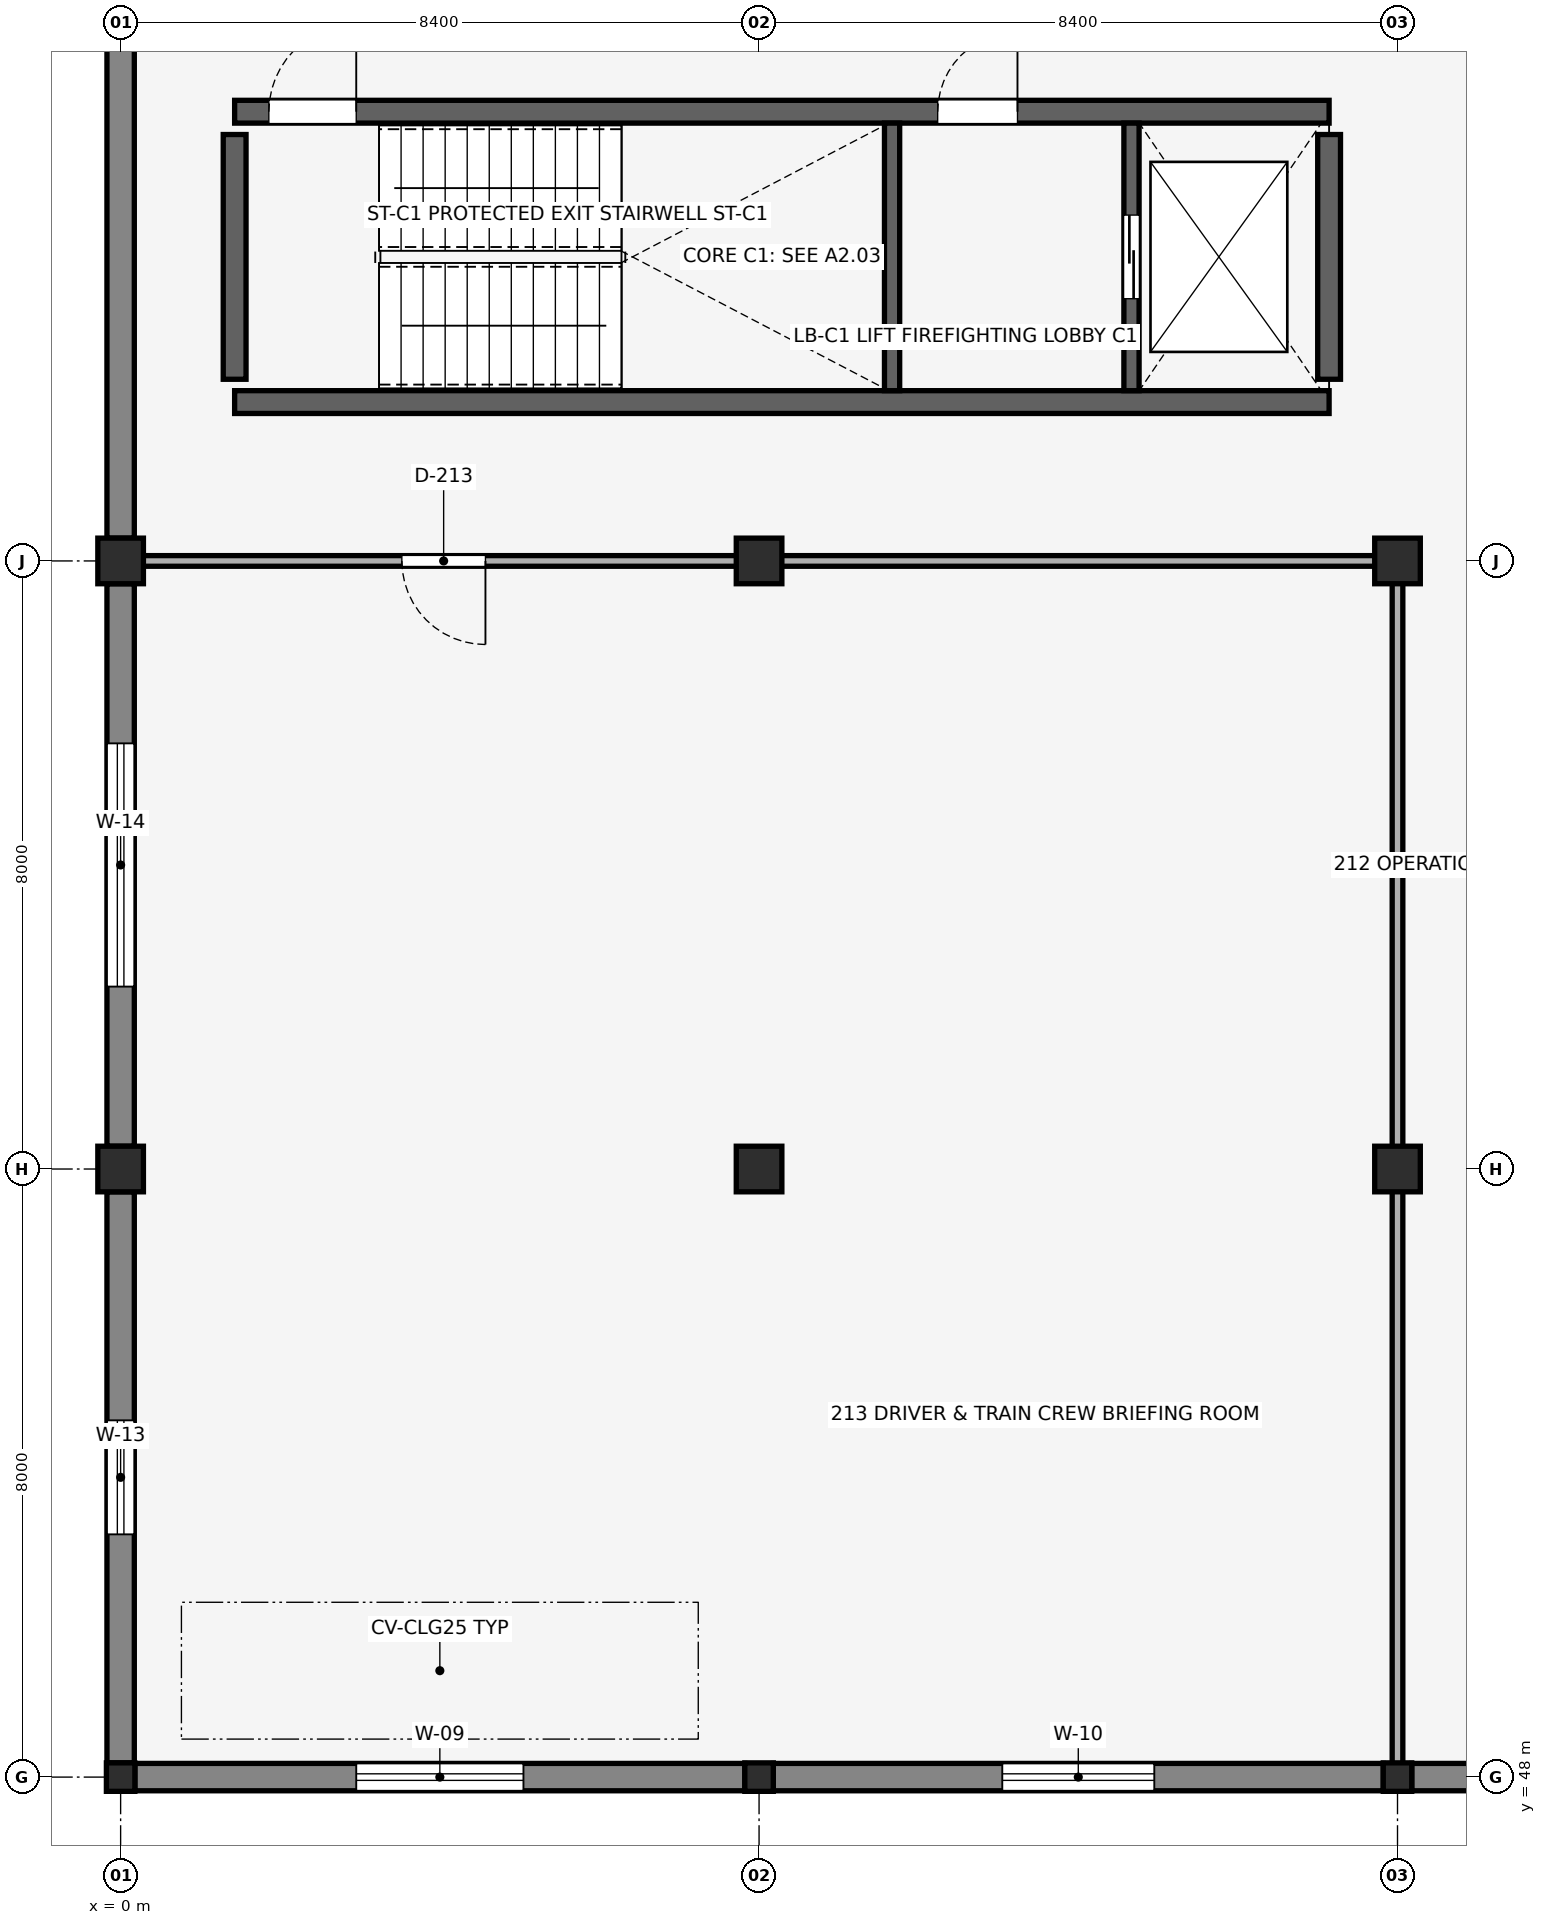
"""IFC4 building model, lengths in metres.
Left out: names, types, materials, properties, quantities, classifications, styles, units other than length and angle.
Written with IfcOpenShell. Run it as: python <this file> out.ifc"""

import sys

from ifc_helpers import new_model, si_unit, direction, frame, frame_2d, origin, origin_2d, place, context, subcontext, project, spatial, rectangle, i_section, extrude, element, fill, save


model = new_model("IFC4")
c1 = context("Model", 3, precision=1e-05, world=origin(), true_north=direction((0.0, 1.0)))
c2 = subcontext(c1, "Body", "Model", "MODEL_VIEW")
j1 = project(units=[si_unit("LENGTHUNIT", "METRE"), si_unit("PLANEANGLEUNIT", "RADIAN")], contexts=[c1])
p1 = place(None, origin())
s1 = spatial("IfcSite", under=j1, at=p1, CompositionType="ELEMENT")
p2 = place(p1, origin())
s2 = spatial("IfcBuilding", under=s1, at=p2, CompositionType="ELEMENT")
p3 = place(p2, frame((0.0, 0.0, 9.52)))
s3 = spatial("IfcBuildingStorey", under=s2, at=p3, CompositionType="ELEMENT", Elevation=9.52)
p4 = place(p3, frame((1.5, 66.09, 0.0), z_axis=(0.0, 0.0, 1.0), x_axis=(1.0, 0.0, 0.0)))
e1 = element("IfcWall", 1, at=p4, inside=s3, PredefinedType="SHEAR", context=c2, shape_type="SweptSolid", body=[
    extrude(rectangle(XDim=14.4, YDim=0.3, at=frame_2d((7.2, 0.0))), origin(), (0.0, 0.0, 1.0), 3.57),
])
p5 = place(p3, frame((1.5, 69.91, 0.0), z_axis=(0.0, 0.0, 1.0), x_axis=(1.0, 0.0, 0.0)))
e2 = element("IfcWall", 2, at=p5, inside=s3, PredefinedType="SHEAR", context=c2, shape_type="SweptSolid", body=[
    extrude(rectangle(XDim=14.4, YDim=0.3, at=frame_2d((7.2, 0.0))), origin(), (0.0, 0.0, 1.0), 3.57),
])
p6 = place(p5, frame((0.45, 0.0, 0.0), z_axis=(0.0, 0.0, 1.0), x_axis=(1.0, 0.0, 0.0)))
e3 = element("IfcOpeningElement", 3, at=p6, cuts=e2, PredefinedType="OPENING", context=c2, shape_type="SweptSolid", body=[
    extrude(rectangle(XDim=1.15, YDim=2.15, at=frame_2d((0.575, 1.075))), frame((0.0, 0.16, 0.0), z_axis=(0.0, -1.0, 0.0), x_axis=(1.0, 0.0, 0.0)), (0.0, 0.0, 1.0), 0.32),
])
p7 = place(p5, frame((9.25, 0.0, 0.0), z_axis=(0.0, 0.0, 1.0), x_axis=(1.0, 0.0, 0.0)))
e4 = element("IfcOpeningElement", 4, at=p7, cuts=e2, PredefinedType="OPENING", context=c2, shape_type="SweptSolid", body=[
    extrude(rectangle(XDim=1.05, YDim=2.15, at=frame_2d((0.525, 1.075))), frame((0.0, 0.16, 0.0), z_axis=(0.0, -1.0, 0.0), x_axis=(1.0, 0.0, 0.0)), (0.0, 0.0, 1.0), 0.32),
])
for number, where, z_axis, x_axis in (
    (5, (1.5, 66.39, 0.0), (0.0, 0.0, 1.0), (0.0, 1.0, 0.0)),
    (6, (15.9, 66.39, 0.0), (0.0, 0.0, 1.0), (0.0, 1.0, 0.0)),
):
    element("IfcWall", number, at=place(p3, frame(where, z_axis=z_axis, x_axis=x_axis)), inside=s3, PredefinedType="SHEAR", context=c2, shape_type="SweptSolid", body=[
        extrude(rectangle(XDim=3.22, YDim=0.3, at=frame_2d((1.61, 0.0))), origin(), (0.0, 0.0, 1.0), 3.57),
    ])
p8 = place(p3, frame((0.0, 48.0, 0.0), z_axis=(0.0, 0.0, 1.0), x_axis=(1.0, 0.0, 0.0)))
e7 = element("IfcColumn", 7, at=p8, inside=s3, PredefinedType="COLUMN", context=c2, shape_type="SweptSolid", body=[
    extrude(i_section(OverallWidth=0.375, OverallDepth=0.375, WebThickness=0.017, FlangeThickness=0.027, FilletRadius=0.015, at=origin_2d()), origin(), (0.0, 0.0, 1.0), 3.57),
])
for number, where, z_axis, x_axis in (
    (8, (0.0, 56.0, 0.0), (0.0, 0.0, 1.0), (1.0, 0.0, 0.0)),
    (9, (0.0, 64.0, 0.0), (0.0, 0.0, 1.0), (1.0, 0.0, 0.0)),
):
    element("IfcColumn", number, at=place(p3, frame(where, z_axis=z_axis, x_axis=x_axis)), inside=s3, PredefinedType="COLUMN", context=c2, shape_type="SweptSolid", body=[
        extrude(rectangle(XDim=0.6, YDim=0.6, at=origin_2d()), origin(), (0.0, 0.0, 1.0), 3.57),
    ])
p9 = place(p3, frame((8.4, 48.0, 0.0), z_axis=(0.0, 0.0, 1.0), x_axis=(1.0, 0.0, 0.0)))
e10 = element("IfcColumn", 10, at=p9, inside=s3, PredefinedType="COLUMN", context=c2, shape_type="SweptSolid", body=[
    extrude(i_section(OverallWidth=0.375, OverallDepth=0.375, WebThickness=0.017, FlangeThickness=0.027, FilletRadius=0.015, at=origin_2d()), origin(), (0.0, 0.0, 1.0), 3.57),
])
for number, where, z_axis, x_axis in (
    (11, (8.4, 56.0, 0.0), (0.0, 0.0, 1.0), (1.0, 0.0, 0.0)),
    (12, (8.4, 64.0, 0.0), (0.0, 0.0, 1.0), (1.0, 0.0, 0.0)),
):
    element("IfcColumn", number, at=place(p3, frame(where, z_axis=z_axis, x_axis=x_axis)), inside=s3, PredefinedType="COLUMN", context=c2, shape_type="SweptSolid", body=[
        extrude(rectangle(XDim=0.6, YDim=0.6, at=origin_2d()), origin(), (0.0, 0.0, 1.0), 3.57),
    ])
p10 = place(p3, frame((16.8, 48.0, 0.0), z_axis=(0.0, 0.0, 1.0), x_axis=(1.0, 0.0, 0.0)))
e13 = element("IfcColumn", 13, at=p10, inside=s3, PredefinedType="COLUMN", context=c2, shape_type="SweptSolid", body=[
    extrude(i_section(OverallWidth=0.375, OverallDepth=0.375, WebThickness=0.017, FlangeThickness=0.027, FilletRadius=0.015, at=origin_2d()), origin(), (0.0, 0.0, 1.0), 3.57),
])
for number, where, z_axis, x_axis in (
    (14, (16.8, 56.0, 0.0), (0.0, 0.0, 1.0), (1.0, 0.0, 0.0)),
    (15, (16.8, 64.0, 0.0), (0.0, 0.0, 1.0), (1.0, 0.0, 0.0)),
):
    element("IfcColumn", number, at=place(p3, frame(where, z_axis=z_axis, x_axis=x_axis)), inside=s3, PredefinedType="COLUMN", context=c2, shape_type="SweptSolid", body=[
        extrude(rectangle(XDim=0.6, YDim=0.6, at=origin_2d()), origin(), (0.0, 0.0, 1.0), 3.57),
    ])
p11 = place(p3, frame((0.187, 48.0, 0.0), z_axis=(0.0, 0.0, 1.0), x_axis=(1.0, 0.0, 0.0)))
e16 = element("IfcWall", 16, at=p11, inside=s3, PredefinedType="SOLIDWALL", context=c2, shape_type="SweptSolid", body=[
    extrude(rectangle(XDim=8.025, YDim=0.36, at=frame_2d((4.013, 0.0))), origin(), (0.0, 0.0, 1.0), 3.27),
])
p12 = place(p11, frame((2.913, 0.0, 0.9), z_axis=(0.0, 0.0, 1.0), x_axis=(1.0, 0.0, 0.0)))
e17 = element("IfcOpeningElement", 17, at=p12, cuts=e16, PredefinedType="OPENING", context=c2, shape_type="SweptSolid", body=[
    extrude(rectangle(XDim=2.2, YDim=1.5, at=frame_2d((1.1, 0.75))), frame((0.0, 0.19, 0.0), z_axis=(0.0, -1.0, 0.0), x_axis=(1.0, 0.0, 0.0)), (0.0, 0.0, 1.0), 0.38),
])
p13 = place(p3, frame((8.587, 48.0, 0.0), z_axis=(0.0, 0.0, 1.0), x_axis=(1.0, 0.0, 0.0)))
e18 = element("IfcWall", 18, at=p13, inside=s3, PredefinedType="SOLIDWALL", context=c2, shape_type="SweptSolid", body=[
    extrude(rectangle(XDim=8.025, YDim=0.36, at=frame_2d((4.013, 0.0))), origin(), (0.0, 0.0, 1.0), 3.27),
])
p14 = place(p13, frame((3.013, 0.0, 0.9), z_axis=(0.0, 0.0, 1.0), x_axis=(1.0, 0.0, 0.0)))
e19 = element("IfcOpeningElement", 19, at=p14, cuts=e18, PredefinedType="OPENING", context=c2, shape_type="SweptSolid", body=[
    extrude(rectangle(XDim=2.0, YDim=1.5, at=frame_2d((1.0, 0.75))), frame((0.0, 0.19, 0.0), z_axis=(0.0, -1.0, 0.0), x_axis=(1.0, 0.0, 0.0)), (0.0, 0.0, 1.0), 0.38),
])
p15 = place(p3, frame((16.987, 48.0, 0.0), z_axis=(0.0, 0.0, 1.0), x_axis=(1.0, 0.0, 0.0)))
e20 = element("IfcWall", 20, at=p15, inside=s3, PredefinedType="SOLIDWALL", context=c2, shape_type="SweptSolid", body=[
    extrude(rectangle(XDim=8.025, YDim=0.36, at=frame_2d((4.013, 0.0))), origin(), (0.0, 0.0, 1.0), 3.27),
])
p16 = place(p15, frame((3.113, 0.0, 0.9), z_axis=(0.0, 0.0, 1.0), x_axis=(1.0, 0.0, 0.0)))
e21 = element("IfcOpeningElement", 21, at=p16, cuts=e20, PredefinedType="OPENING", context=c2, shape_type="SweptSolid", body=[
    extrude(rectangle(XDim=1.8, YDim=1.45, at=frame_2d((0.9, 0.725))), frame((0.0, 0.19, 0.0), z_axis=(0.0, -1.0, 0.0), x_axis=(1.0, 0.0, 0.0)), (0.0, 0.0, 1.0), 0.38),
])
p17 = place(p3, frame((0.0, 48.187, 0.0), z_axis=(0.0, 0.0, 1.0), x_axis=(0.0, 1.0, 0.0)))
e22 = element("IfcWall", 22, at=p17, inside=s3, PredefinedType="SOLIDWALL", context=c2, shape_type="SweptSolid", body=[
    extrude(rectangle(XDim=7.513, YDim=0.36, at=frame_2d((3.756, 0.0))), origin(), (0.0, 0.0, 1.0), 3.219),
])
p18 = place(p17, frame((3.006, 0.0, 0.9), z_axis=(0.0, 0.0, 1.0), x_axis=(1.0, 0.0, 0.0)))
e23 = element("IfcOpeningElement", 23, at=p18, cuts=e22, PredefinedType="OPENING", context=c2, shape_type="SweptSolid", body=[
    extrude(rectangle(XDim=1.5, YDim=1.4, at=frame_2d((0.75, 0.7))), frame((0.0, 0.19, 0.0), z_axis=(0.0, -1.0, 0.0), x_axis=(1.0, 0.0, 0.0)), (0.0, 0.0, 1.0), 0.38),
])
p19 = place(p3, frame((0.0, 56.3, 0.0), z_axis=(0.0, 0.0, 1.0), x_axis=(0.0, 1.0, 0.0)))
e24 = element("IfcWall", 24, at=p19, inside=s3, PredefinedType="SOLIDWALL", context=c2, shape_type="SweptSolid", body=[
    extrude(rectangle(XDim=7.4, YDim=0.36, at=frame_2d((3.7, 0.0))), origin(), (0.0, 0.0, 1.0), 3.219),
])
p20 = place(p19, frame((2.1, 0.0, 1.55), z_axis=(0.0, 0.0, 1.0), x_axis=(1.0, 0.0, 0.0)))
e25 = element("IfcOpeningElement", 25, at=p20, cuts=e24, PredefinedType="OPENING", context=c2, shape_type="SweptSolid", body=[
    extrude(rectangle(XDim=3.2, YDim=0.9, at=frame_2d((1.6, 0.45))), frame((0.0, 0.19, 0.0), z_axis=(0.0, -1.0, 0.0), x_axis=(1.0, 0.0, 0.0)), (0.0, 0.0, 1.0), 0.38),
])
p21 = place(p3, frame((0.0, 64.3, 0.0), z_axis=(0.0, 0.0, 1.0), x_axis=(0.0, 1.0, 0.0)))
e26 = element("IfcWall", 26, at=p21, inside=s3, PredefinedType="SOLIDWALL", context=c2, shape_type="SweptSolid", body=[
    extrude(rectangle(XDim=7.4, YDim=0.36, at=frame_2d((3.7, 0.0))), origin(), (0.0, 0.0, 1.0), 3.27),
])
p22 = place(p3, frame((10.15, 66.24, 0.0), z_axis=(0.0, 0.0, 1.0), x_axis=(0.0, 1.0, 0.0)))
e27 = element("IfcWall", 27, at=p22, inside=s3, PredefinedType="SHEAR", context=c2, shape_type="SweptSolid", body=[
    extrude(rectangle(XDim=3.52, YDim=0.2, at=frame_2d((1.76, 0.0))), origin(), (0.0, 0.0, 1.0), 3.57),
])
p23 = place(p3, frame((13.3, 66.24, 0.0), z_axis=(0.0, 0.0, 1.0), x_axis=(0.0, 1.0, 0.0)))
e28 = element("IfcWall", 28, at=p23, inside=s3, PredefinedType="SHEAR", context=c2, shape_type="SweptSolid", body=[
    extrude(rectangle(XDim=3.52, YDim=0.2, at=frame_2d((1.76, 0.0))), origin(), (0.0, 0.0, 1.0), 3.57),
])
p24 = place(p23, frame((1.21, 0.0, 0.0), z_axis=(0.0, 0.0, 1.0), x_axis=(1.0, 0.0, 0.0)))
e29 = element("IfcOpeningElement", 29, at=p24, cuts=e28, PredefinedType="OPENING", context=c2, shape_type="SweptSolid", body=[
    extrude(rectangle(XDim=1.1, YDim=2.15, at=frame_2d((0.55, 1.075))), frame((0.0, 0.11, 0.0), z_axis=(0.0, -1.0, 0.0), x_axis=(1.0, 0.0, 0.0)), (0.0, 0.0, 1.0), 0.22),
])
p25 = place(p3, frame((0.29, 64.0, 0.0), z_axis=(0.0, 0.0, 1.0), x_axis=(1.0, 0.0, 0.0)))
e30 = element("IfcWall", 30, at=p25, inside=s3, PredefinedType="PARTITIONING", context=c2, shape_type="SweptSolid", body=[
    extrude(rectangle(XDim=7.82, YDim=0.14, at=frame_2d((3.91, 0.0))), origin(), (0.0, 0.0, 1.0), 3.037),
])
p26 = place(p25, frame((4.51, 0.0, 0.0), z_axis=(0.0, 0.0, 1.0), x_axis=(-1.0, 0.0, 0.0)))
e31 = element("IfcOpeningElement", 31, at=p26, cuts=e30, PredefinedType="OPENING", context=c2, shape_type="SweptSolid", body=[
    extrude(rectangle(XDim=1.1, YDim=2.2, at=frame_2d((0.55, 1.1))), frame((0.0, 0.08, 0.0), z_axis=(0.0, -1.0, 0.0), x_axis=(1.0, 0.0, 0.0)), (0.0, 0.0, 1.0), 0.16),
])
p27 = place(p3, frame((8.69, 64.0, 0.0), z_axis=(0.0, 0.0, 1.0), x_axis=(1.0, 0.0, 0.0)))
e32 = element("IfcWall", 32, at=p27, inside=s3, PredefinedType="PARTITIONING", context=c2, shape_type="SweptSolid", body=[
    extrude(rectangle(XDim=7.82, YDim=0.14, at=frame_2d((3.91, 0.0))), origin(), (0.0, 0.0, 1.0), 3.037),
])
p28 = place(p3, frame((16.8, 48.177, 0.0), z_axis=(0.0, 0.0, 1.0), x_axis=(0.0, 1.0, 0.0)))
e33 = element("IfcWall", 33, at=p28, inside=s3, PredefinedType="PARTITIONING", context=c2, shape_type="SweptSolid", body=[
    extrude(rectangle(XDim=7.533, YDim=0.14, at=frame_2d((3.766, 0.0))), origin(), (0.0, 0.0, 1.0), 3.107),
])
p29 = place(p3, frame((16.8, 56.29, 0.0), z_axis=(0.0, 0.0, 1.0), x_axis=(0.0, 1.0, 0.0)))
e34 = element("IfcWall", 34, at=p29, inside=s3, PredefinedType="PARTITIONING", context=c2, shape_type="SweptSolid", body=[
    extrude(rectangle(XDim=7.42, YDim=0.14, at=frame_2d((3.71, 0.0))), origin(), (0.0, 0.0, 1.0), 3.107),
])
p30 = place(p12, origin())
e35 = element("IfcWindow", 35, at=p30, inside=s3, PartitioningType="DOUBLE_PANEL_VERTICAL", PredefinedType="WINDOW", context=c2, shape_type="SweptSolid", body=[
    extrude(rectangle(XDim=2.2, YDim=1.5, at=frame_2d((1.1, 0.75))), frame((0.0, 0.03, 0.0), z_axis=(0.0, -1.0, 0.0), x_axis=(1.0, 0.0, 0.0)), (0.0, 0.0, 1.0), 0.06),
])
fill(e17, e35)
p31 = place(p14, origin())
e36 = element("IfcWindow", 36, at=p31, inside=s3, PartitioningType="DOUBLE_PANEL_VERTICAL", PredefinedType="WINDOW", context=c2, shape_type="SweptSolid", body=[
    extrude(rectangle(XDim=2.0, YDim=1.5, at=frame_2d((1.0, 0.75))), frame((0.0, 0.03, 0.0), z_axis=(0.0, -1.0, 0.0), x_axis=(1.0, 0.0, 0.0)), (0.0, 0.0, 1.0), 0.06),
])
fill(e19, e36)
p32 = place(p18, origin())
e37 = element("IfcWindow", 37, at=p32, inside=s3, PartitioningType="SINGLE_PANEL", PredefinedType="WINDOW", context=c2, shape_type="SweptSolid", body=[
    extrude(rectangle(XDim=1.5, YDim=1.4, at=frame_2d((0.75, 0.7))), frame((0.0, 0.03, 0.0), z_axis=(0.0, -1.0, 0.0), x_axis=(1.0, 0.0, 0.0)), (0.0, 0.0, 1.0), 0.06),
])
fill(e23, e37)
p33 = place(p20, origin())
e38 = element("IfcWindow", 38, at=p33, inside=s3, PartitioningType="TRIPLE_PANEL_HORIZONTAL", PredefinedType="WINDOW", context=c2, shape_type="SweptSolid", body=[
    extrude(rectangle(XDim=3.2, YDim=0.9, at=frame_2d((1.6, 0.45))), frame((0.0, 0.03, 0.0), z_axis=(0.0, -1.0, 0.0), x_axis=(1.0, 0.0, 0.0)), (0.0, 0.0, 1.0), 0.06),
])
fill(e25, e38)
p34 = place(p6, origin())
e39 = element("IfcDoor", 39, at=p34, inside=s3, OperationType="SINGLE_SWING_RIGHT", PredefinedType="DOOR", context=c2, shape_type="SweptSolid", body=[
    extrude(rectangle(XDim=1.15, YDim=2.15, at=frame_2d((0.575, 1.075))), frame((0.0, 0.025, 0.0), z_axis=(0.0, -1.0, 0.0), x_axis=(1.0, 0.0, 0.0)), (0.0, 0.0, 1.0), 0.05),
])
fill(e3, e39)
p35 = place(p7, origin())
e40 = element("IfcDoor", 40, at=p35, inside=s3, OperationType="SINGLE_SWING_RIGHT", PredefinedType="DOOR", context=c2, shape_type="SweptSolid", body=[
    extrude(rectangle(XDim=1.05, YDim=2.15, at=frame_2d((0.525, 1.075))), frame((0.0, 0.025, 0.0), z_axis=(0.0, -1.0, 0.0), x_axis=(1.0, 0.0, 0.0)), (0.0, 0.0, 1.0), 0.05),
])
fill(e4, e40)
p36 = place(p24, origin())
e41 = element("IfcDoor", 41, at=p36, inside=s3, OperationType="DOUBLE_DOOR_SLIDING", PredefinedType="DOOR", context=c2, shape_type="SweptSolid", body=[
    extrude(rectangle(XDim=1.1, YDim=2.15, at=frame_2d((0.55, 1.075))), frame((0.0, 0.025, 0.0), z_axis=(0.0, -1.0, 0.0), x_axis=(1.0, 0.0, 0.0)), (0.0, 0.0, 1.0), 0.05),
])
fill(e29, e41)
p37 = place(p26, origin())
e42 = element("IfcDoor", 42, at=p37, inside=s3, OperationType="SINGLE_SWING_LEFT", PredefinedType="DOOR", context=c2, shape_type="SweptSolid", body=[
    extrude(rectangle(XDim=1.1, YDim=2.2, at=frame_2d((0.55, 1.1))), frame((0.0, 0.025, 0.0), z_axis=(0.0, -1.0, 0.0), x_axis=(1.0, 0.0, 0.0)), (0.0, 0.0, 1.0), 0.05),
])
fill(e31, e42)
save(model, sys.argv[1])
